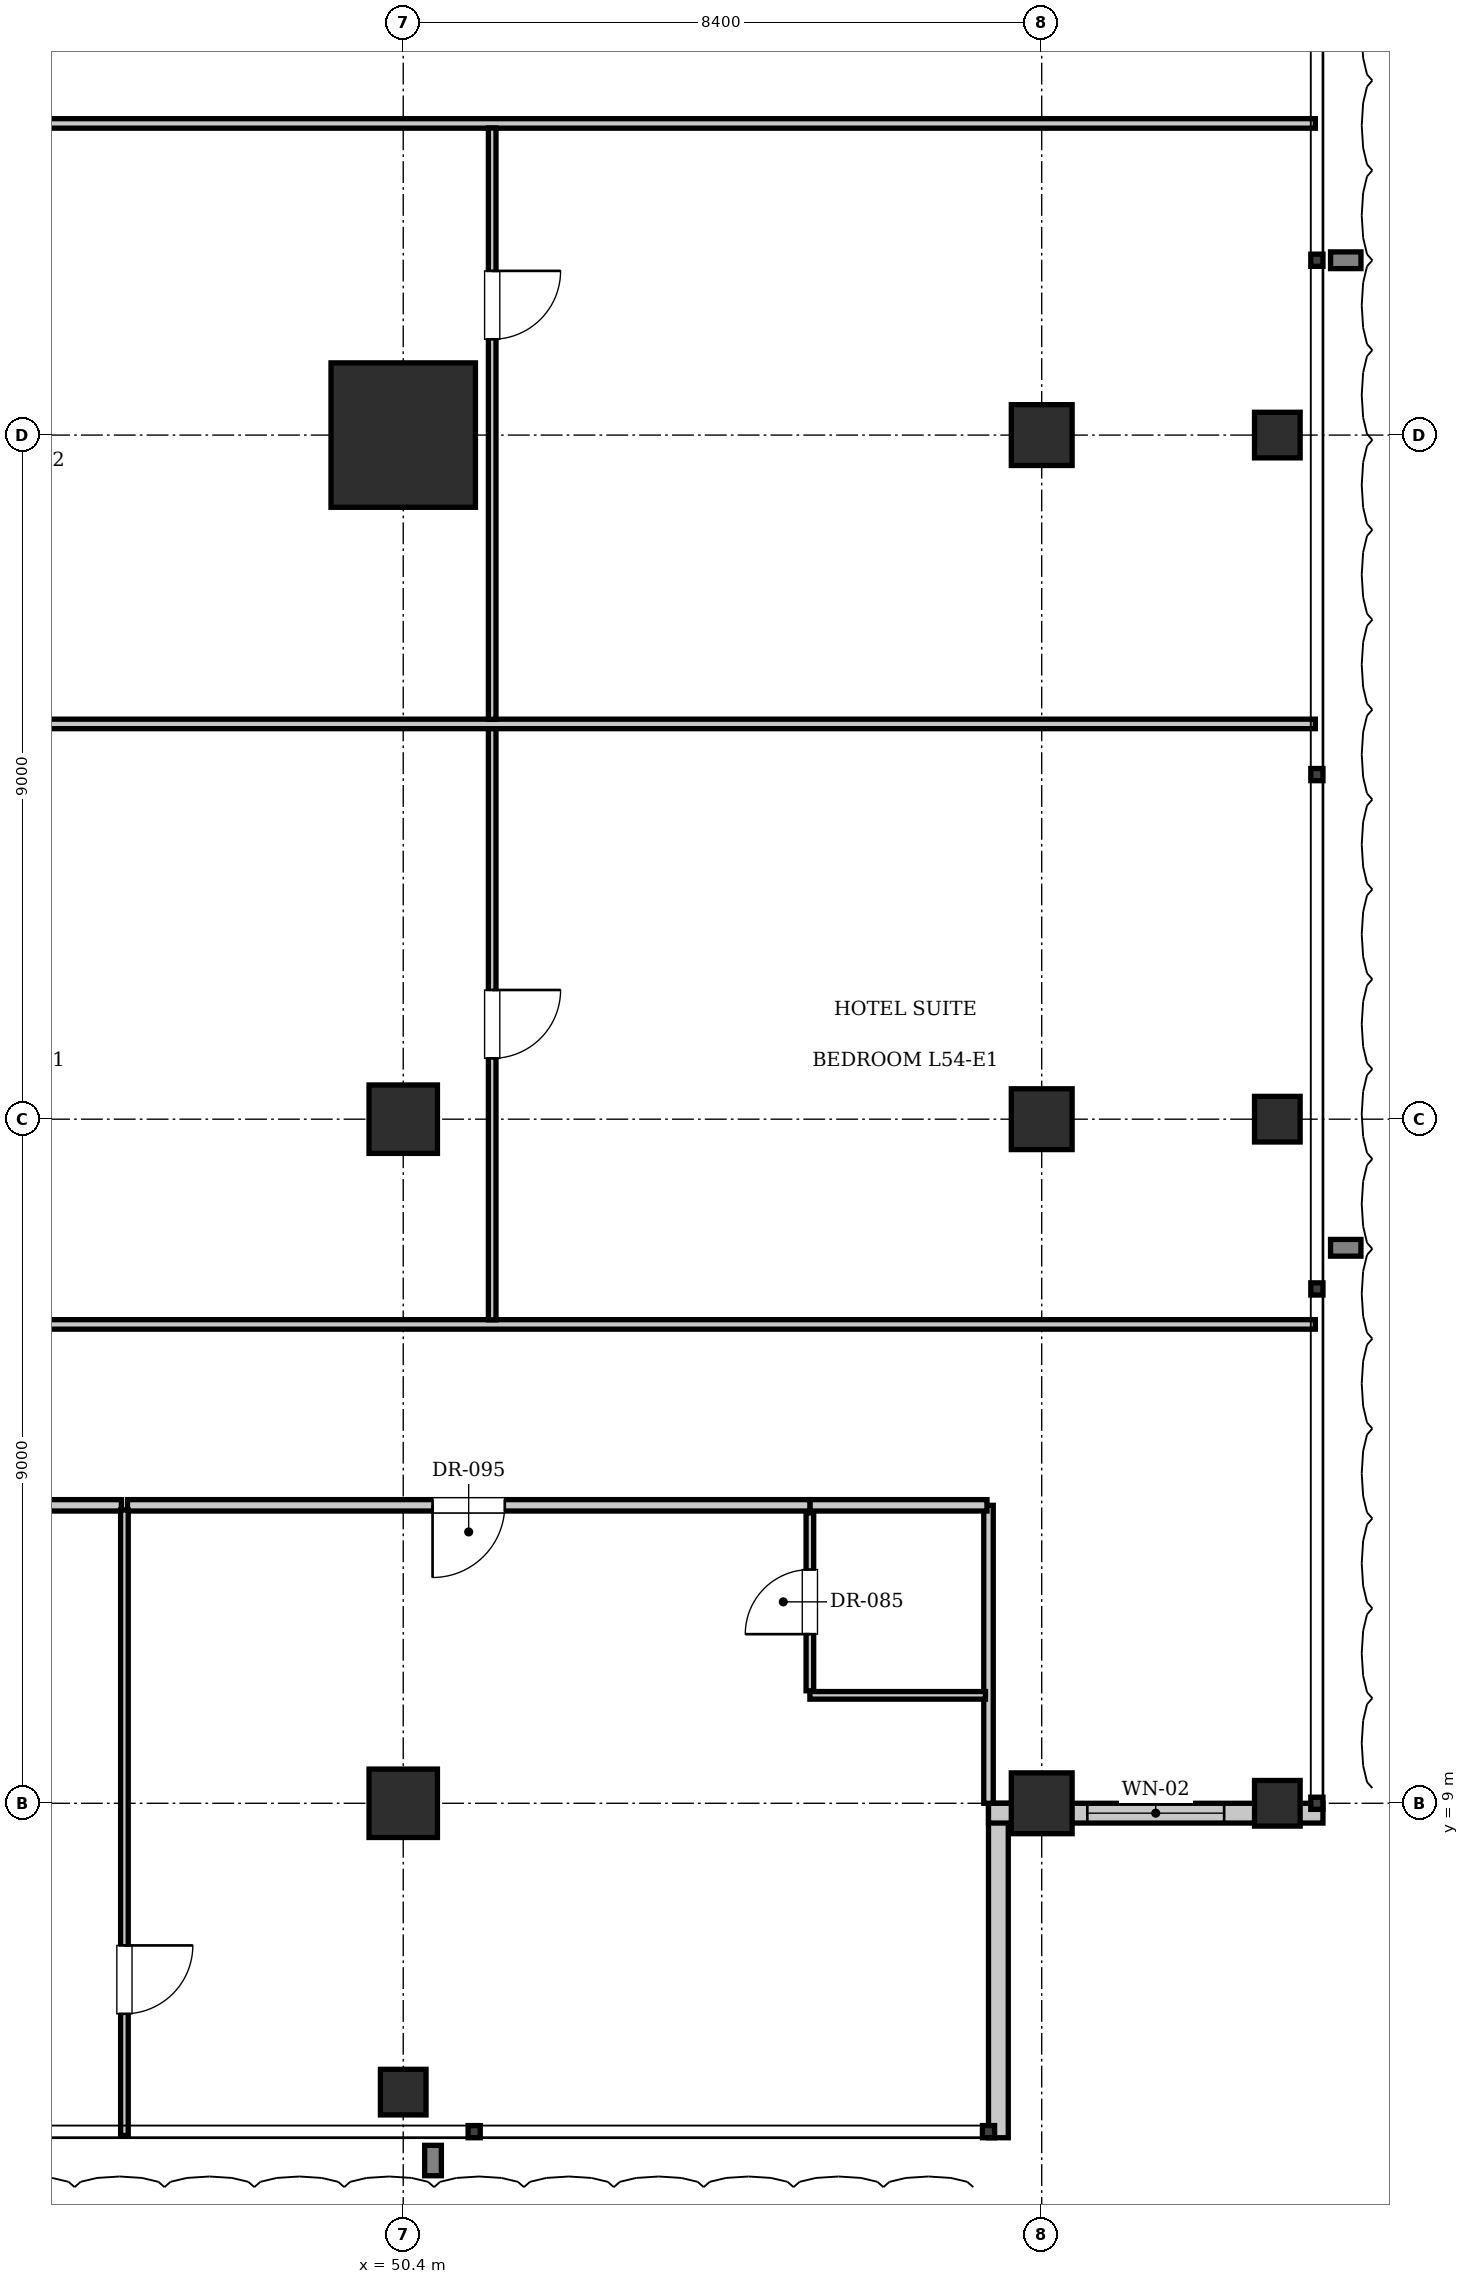
"""IFC4 building model, lengths in metres.
Left out: names, types, materials, properties, quantities, classifications, styles, units other than length and angle.
Written with IfcOpenShell. Run it as: python <this file> out.ifc"""

import sys

from ifc_helpers import new_model, si_unit, direction, frame, frame_2d, origin, origin_2d, place, context, subcontext, project, spatial, rectangle, i_section, extrude, element, fill, save


model = new_model("IFC4")
c1 = context("Model", 3, precision=1e-05, world=origin(), true_north=direction((0.0, 1.0)))
c2 = subcontext(c1, "Body", "Model", "MODEL_VIEW")
j1 = project(units=[si_unit("LENGTHUNIT", "METRE"), si_unit("PLANEANGLEUNIT", "RADIAN")], contexts=[c1])
p1 = place(None, origin())
s1 = spatial("IfcSite", under=j1, at=p1, CompositionType="ELEMENT")
p2 = place(p1, origin())
s2 = spatial("IfcBuilding", under=s1, at=p2, CompositionType="ELEMENT")
p3 = place(p2, frame((0.0, 0.0, 219.8)))
s3 = spatial("IfcBuildingStorey", under=s2, at=p3, CompositionType="ELEMENT", Elevation=219.8)
p4 = place(p3, frame((50.4, 27.0, 0.0), z_axis=(0.0, 0.0, 1.0), x_axis=(1.0, 0.0, 0.0)))
e1 = element("IfcColumn", 1, at=p4, inside=s3, PredefinedType="COLUMN", context=c2, shape_type="SweptSolid", body=[
    extrude(rectangle(XDim=1.9, YDim=1.9, at=origin_2d()), origin(), (0.0, 0.0, 1.0), 3.85),
])
for number, where, z_axis, x_axis in (
    (2, (50.4, 18.0, 0.0), (0.0, 0.0, 1.0), (1.0, 0.0, 0.0)),
    (3, (50.4, 9.0, 0.0), (0.0, 0.0, 1.0), (1.0, 0.0, 0.0)),
):
    element("IfcColumn", number, at=place(p3, frame(where, z_axis=z_axis, x_axis=x_axis)), inside=s3, PredefinedType="COLUMN", context=c2, shape_type="SweptSolid", body=[
        extrude(rectangle(XDim=0.9, YDim=0.9, at=origin_2d()), origin(), (0.0, 0.0, 1.0), 3.85),
    ])
for number, where, z_axis, x_axis in (
    (4, (58.8, 9.0, 0.0), (0.0, 0.0, 1.0), (1.0, 0.0, 0.0)),
    (5, (58.8, 18.0, 0.0), (0.0, 0.0, 1.0), (1.0, 0.0, 0.0)),
    (6, (58.8, 27.0, 0.0), (0.0, 0.0, 1.0), (1.0, 0.0, 0.0)),
):
    element("IfcColumn", number, at=place(p3, frame(where, z_axis=z_axis, x_axis=x_axis)), inside=s3, PredefinedType="COLUMN", context=c2, shape_type="SweptSolid", body=[
        extrude(rectangle(XDim=0.8, YDim=0.8, at=origin_2d()), origin(), (0.0, 0.0, 1.0), 3.85),
    ])
for number, where, z_axis, x_axis in (
    (7, (61.9, 9.0, 0.0), (0.0, 0.0, 1.0), (1.0, 0.0, 0.0)),
    (8, (61.9, 18.0, 0.0), (0.0, 0.0, 1.0), (1.0, 0.0, 0.0)),
    (9, (61.9, 27.0, 0.0), (0.0, 0.0, 1.0), (1.0, 0.0, 0.0)),
    (10, (50.4, 5.2, 0.0), (0.0, 0.0, 1.0), (1.0, 0.0, 0.0)),
):
    element("IfcColumn", number, at=place(p3, frame(where, z_axis=z_axis, x_axis=x_axis)), inside=s3, PredefinedType="COLUMN", context=c2, shape_type="SweptSolid", body=[
        extrude(i_section(OverallWidth=0.6, OverallDepth=0.6, WebThickness=0.025, FlangeThickness=0.038, at=origin_2d()), origin(), (0.0, 0.0, 1.0), 3.85),
    ])
p5 = place(p3, frame((58.23, 9.0, 0.0), z_axis=(0.0, 0.0, 1.0), x_axis=(0.0, -1.0, 0.0)))
e11 = element("IfcWall", 11, at=p5, inside=s3, PredefinedType="SOLIDWALL", context=c2, shape_type="SweptSolid", body=[
    extrude(rectangle(XDim=4.4, YDim=0.26, at=frame_2d((2.2, 0.0))), origin(), (0.0, 0.0, 1.0), 3.61),
])
p6 = place(p3, frame((62.5, 8.87, 0.0), z_axis=(0.0, 0.0, 1.0), x_axis=(-1.0, 0.0, 0.0)))
e12 = element("IfcWall", 12, at=p6, inside=s3, PredefinedType="SOLIDWALL", context=c2, shape_type="SweptSolid", body=[
    extrude(rectangle(XDim=4.4, YDim=0.26, at=frame_2d((2.2, 0.0))), origin(), (0.0, 0.0, 1.0), 3.071),
])
p7 = place(p6, frame((1.3, 0.0, 0.9)))
e13 = element("IfcOpeningElement", 13, at=p7, cuts=e12, PredefinedType="OPENING", context=c2, shape_type="SweptSolid", body=[
    extrude(rectangle(XDim=1.8, YDim=2.1, at=frame_2d((0.9, 1.05))), frame((0.0, 0.14, 0.0), z_axis=(0.0, -1.0, 0.0), x_axis=(1.0, 0.0, 0.0)), (0.0, 0.0, 1.0), 0.28),
])
p8 = place(p3, frame((58.1, 9.0, 0.0), z_axis=(0.0, 0.0, 1.0), x_axis=(0.0, 1.0, 0.0)))
e14 = element("IfcWall", 14, at=p8, inside=s3, PredefinedType="PARTITIONING", context=c2, shape_type="SweptSolid", body=[
    extrude(rectangle(XDim=3.92, YDim=0.125, at=frame_2d((1.96, 0.0))), origin(), (0.0, 0.0, 1.0), 3.61),
])
p9 = place(p3, frame((55.75, 12.92, 0.0), z_axis=(0.0, 0.0, 1.0), x_axis=(1.0, 0.0, 0.0)))
e15 = element("IfcWall", 15, at=p9, inside=s3, PredefinedType="PARTITIONING", context=c2, shape_type="SweptSolid", body=[
    extrude(rectangle(XDim=2.33, YDim=0.15, at=frame_2d((1.165, 0.0))), origin(), (0.0, 0.0, 1.0), 3.61),
])
p10 = place(p3, frame((55.75, 10.42, 0.0), z_axis=(0.0, 0.0, 1.0), x_axis=(1.0, 0.0, 0.0)))
e16 = element("IfcWall", 16, at=p10, inside=s3, PredefinedType="PARTITIONING", context=c2, shape_type="SweptSolid", body=[
    extrude(rectangle(XDim=2.31, YDim=0.1, at=frame_2d((1.155, 0.0))), origin(), (0.0, 0.0, 1.0), 3.61),
])
p11 = place(p3, frame((55.75, 10.48, 0.0), z_axis=(0.0, 0.0, 1.0), x_axis=(0.0, 1.0, 0.0)))
e17 = element("IfcWall", 17, at=p11, inside=s3, PredefinedType="PARTITIONING", context=c2, shape_type="SweptSolid", body=[
    extrude(rectangle(XDim=2.34, YDim=0.1, at=frame_2d((1.17, 0.0))), origin(), (0.0, 0.0, 1.0), 3.61),
])
p12 = place(p11, frame((0.745, 0.0, 0.0)))
e18 = element("IfcOpeningElement", 18, at=p12, cuts=e17, PredefinedType="OPENING", context=c2, shape_type="SweptSolid", body=[
    extrude(rectangle(XDim=0.85, YDim=2.1, at=frame_2d((0.425, 1.05))), frame((0.0, 0.06, 0.0), z_axis=(0.0, -1.0, 0.0), x_axis=(1.0, 0.0, 0.0)), (0.0, 0.0, 1.0), 0.12),
])
p13 = place(p3, frame((37.82, 12.92, 0.0), z_axis=(0.0, 0.0, 1.0), x_axis=(1.0, 0.0, 0.0)))
e19 = element("IfcWall", 19, at=p13, inside=s3, PredefinedType="PARTITIONING", context=c2, shape_type="SweptSolid", body=[
    extrude(rectangle(XDim=8.872, YDim=0.15, at=frame_2d((4.436, 0.0))), origin(), (0.0, 0.0, 1.0), 3.61),
])
p14 = place(p3, frame((46.772, 12.92, 0.0), z_axis=(0.0, 0.0, 1.0), x_axis=(1.0, 0.0, 0.0)))
e20 = element("IfcWall", 20, at=p14, inside=s3, PredefinedType="PARTITIONING", context=c2, shape_type="SweptSolid", body=[
    extrude(rectangle(XDim=8.978, YDim=0.15, at=frame_2d((4.489, 0.0))), origin(), (0.0, 0.0, 1.0), 3.61),
])
p15 = place(p14, frame((4.014, 0.0, 0.0)))
e21 = element("IfcOpeningElement", 21, at=p15, cuts=e20, PredefinedType="OPENING", context=c2, shape_type="SweptSolid", body=[
    extrude(rectangle(XDim=0.95, YDim=2.15, at=frame_2d((0.475, 1.075))), frame((0.0, 0.085, 0.0), z_axis=(0.0, -1.0, 0.0), x_axis=(1.0, 0.0, 0.0)), (0.0, 0.0, 1.0), 0.17),
])
p16 = place(p3, frame((46.732, 4.63, 0.0), z_axis=(0.0, 0.0, 1.0), x_axis=(0.0, 1.0, 0.0)))
e22 = element("IfcWall", 22, at=p16, inside=s3, PredefinedType="PARTITIONING", context=c2, shape_type="SweptSolid", body=[
    extrude(rectangle(XDim=8.23, YDim=0.1, at=frame_2d((4.115, 0.0))), origin(), (0.0, 0.0, 1.0), 3.61),
])
p17 = place(p16, frame((1.6, 0.0, 0.0)))
e23 = element("IfcOpeningElement", 23, at=p17, cuts=e22, PredefinedType="OPENING", context=c2, shape_type="SweptSolid", body=[
    extrude(rectangle(XDim=0.9, YDim=2.1, at=frame_2d((0.45, 1.05))), frame((0.0, 0.06, 0.0), z_axis=(0.0, -1.0, 0.0), x_axis=(1.0, 0.0, 0.0)), (0.0, 0.0, 1.0), 0.12),
])
for number, where, z_axis, x_axis in (
    (24, (37.28, 15.3, 0.0), (0.0, 0.0, 1.0), (1.0, 0.0, 0.0)),
    (25, (37.28, 31.1, 0.0), (0.0, 0.0, 1.0), (1.0, 0.0, 0.0)),
):
    element("IfcWall", number, at=place(p3, frame(where, z_axis=z_axis, x_axis=x_axis)), inside=s3, PredefinedType="PARTITIONING", context=c2, shape_type="SweptSolid", body=[
        extrude(rectangle(XDim=25.12, YDim=0.125, at=frame_2d((12.56, 0.0))), origin(), (0.0, 0.0, 1.0), 3.61),
    ])
p18 = place(p3, frame((51.57, 15.36, 0.0), z_axis=(0.0, 0.0, 1.0), x_axis=(0.0, 1.0, 0.0)))
e26 = element("IfcWall", 26, at=p18, inside=s3, PredefinedType="PARTITIONING", context=c2, shape_type="SweptSolid", body=[
    extrude(rectangle(XDim=7.78, YDim=0.1, at=frame_2d((3.89, 0.0))), origin(), (0.0, 0.0, 1.0), 3.61),
])
p19 = place(p18, frame((3.44, 0.0, 0.0)))
e27 = element("IfcOpeningElement", 27, at=p19, cuts=e26, PredefinedType="OPENING", context=c2, shape_type="SweptSolid", body=[
    extrude(rectangle(XDim=0.9, YDim=2.1, at=frame_2d((0.45, 1.05))), frame((0.0, 0.06, 0.0), z_axis=(0.0, -1.0, 0.0), x_axis=(1.0, 0.0, 0.0)), (0.0, 0.0, 1.0), 0.12),
])
p20 = place(p3, frame((37.28, 23.2, 0.0), z_axis=(0.0, 0.0, 1.0), x_axis=(1.0, 0.0, 0.0)))
e28 = element("IfcWall", 28, at=p20, inside=s3, PredefinedType="PARTITIONING", context=c2, shape_type="SweptSolid", body=[
    extrude(rectangle(XDim=25.12, YDim=0.125, at=frame_2d((12.56, 0.0))), origin(), (0.0, 0.0, 1.0), 3.61),
])
p21 = place(p3, frame((51.57, 23.26, 0.0), z_axis=(0.0, 0.0, 1.0), x_axis=(0.0, 1.0, 0.0)))
e29 = element("IfcWall", 29, at=p21, inside=s3, PredefinedType="PARTITIONING", context=c2, shape_type="SweptSolid", body=[
    extrude(rectangle(XDim=7.78, YDim=0.1, at=frame_2d((3.89, 0.0))), origin(), (0.0, 0.0, 1.0), 3.61),
])
p22 = place(p21, frame((5.0, 0.0, 0.0)))
e30 = element("IfcOpeningElement", 30, at=p22, cuts=e29, PredefinedType="OPENING", context=c2, shape_type="SweptSolid", body=[
    extrude(rectangle(XDim=0.9, YDim=2.1, at=frame_2d((0.45, 1.05))), frame((0.0, 0.06, 0.0), z_axis=(0.0, -1.0, 0.0), x_axis=(1.0, 0.0, 0.0)), (0.0, 0.0, 1.0), 0.12),
])
p23 = place(p7, origin())
e31 = element("IfcWindow", 31, at=p23, inside=s3, PartitioningType="SINGLE_PANEL", PredefinedType="WINDOW", context=c2, shape_type="SweptSolid", body=[
    extrude(rectangle(XDim=1.8, YDim=2.1, at=frame_2d((0.9, 1.05))), frame((0.0, 0.03, 0.0), z_axis=(0.0, -1.0, 0.0), x_axis=(1.0, 0.0, 0.0)), (0.0, 0.0, 1.0), 0.06),
])
fill(e13, e31)
p24 = place(p12, origin())
e32 = element("IfcDoor", 32, at=p24, inside=s3, OperationType="SINGLE_SWING_LEFT", PredefinedType="DOOR", context=c2, shape_type="SweptSolid", body=[
    extrude(rectangle(XDim=0.85, YDim=2.1, at=frame_2d((0.425, 1.05))), frame((0.0, 0.025, 0.0), z_axis=(0.0, -1.0, 0.0), x_axis=(1.0, 0.0, 0.0)), (0.0, 0.0, 1.0), 0.05),
])
fill(e18, e32)
p25 = place(p15, frame((0.95, 0.0, 0.0), z_axis=(0.0, 0.0, 1.0), x_axis=(-1.0, 0.0, 0.0)))
e33 = element("IfcDoor", 33, at=p25, inside=s3, OperationType="SINGLE_SWING_RIGHT", PredefinedType="DOOR", context=c2, shape_type="SweptSolid", body=[
    extrude(rectangle(XDim=0.95, YDim=2.15, at=frame_2d((0.475, 1.075))), frame((0.0, 0.025, 0.0), z_axis=(0.0, -1.0, 0.0), x_axis=(1.0, 0.0, 0.0)), (0.0, 0.0, 1.0), 0.05),
])
fill(e21, e33)
p26 = place(p17, frame((0.9, 0.0, 0.0), z_axis=(0.0, 0.0, 1.0), x_axis=(-1.0, 0.0, 0.0)))
e34 = element("IfcDoor", 34, at=p26, inside=s3, OperationType="SINGLE_SWING_LEFT", PredefinedType="DOOR", context=c2, shape_type="SweptSolid", body=[
    extrude(rectangle(XDim=0.9, YDim=2.1, at=frame_2d((0.45, 1.05))), frame((0.0, 0.025, 0.0), z_axis=(0.0, -1.0, 0.0), x_axis=(1.0, 0.0, 0.0)), (0.0, 0.0, 1.0), 0.05),
])
fill(e23, e34)
p27 = place(p19, frame((0.9, 0.0, 0.0), z_axis=(0.0, 0.0, 1.0), x_axis=(-1.0, 0.0, 0.0)))
e35 = element("IfcDoor", 35, at=p27, inside=s3, OperationType="SINGLE_SWING_LEFT", PredefinedType="DOOR", context=c2, shape_type="SweptSolid", body=[
    extrude(rectangle(XDim=0.9, YDim=2.1, at=frame_2d((0.45, 1.05))), frame((0.0, 0.025, 0.0), z_axis=(0.0, -1.0, 0.0), x_axis=(1.0, 0.0, 0.0)), (0.0, 0.0, 1.0), 0.05),
])
fill(e27, e35)
p28 = place(p22, frame((0.9, 0.0, 0.0), z_axis=(0.0, 0.0, 1.0), x_axis=(-1.0, 0.0, 0.0)))
e36 = element("IfcDoor", 36, at=p28, inside=s3, OperationType="SINGLE_SWING_LEFT", PredefinedType="DOOR", context=c2, shape_type="SweptSolid", body=[
    extrude(rectangle(XDim=0.9, YDim=2.1, at=frame_2d((0.45, 1.05))), frame((0.0, 0.025, 0.0), z_axis=(0.0, -1.0, 0.0), x_axis=(1.0, 0.0, 0.0)), (0.0, 0.0, 1.0), 0.05),
])
fill(e30, e36)
save(model, sys.argv[1])
